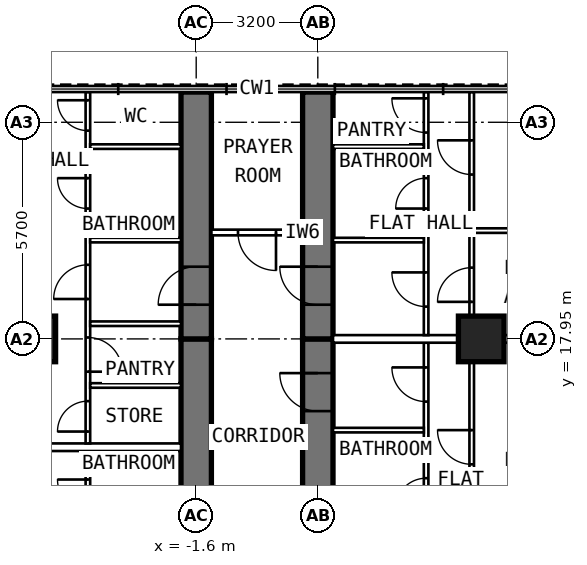
"""IFC4 building model, lengths in metres.
Left out: names, types, materials, properties, quantities, classifications, styles, units other than length and angle.
Written with IfcOpenShell. Run it as: python <this file> out.ifc"""

import sys

from ifc_helpers import new_model, si_unit, direction, frame, frame_2d, origin, origin_2d, place, context, subcontext, project, spatial, rectangle, extrude, element, fill, save


model = new_model("IFC4")
c1 = context("Model", 3, precision=1e-05, world=origin(), true_north=direction((0.0, 1.0)))
c2 = subcontext(c1, "Body", "Model", "MODEL_VIEW")
j1 = project(units=[si_unit("LENGTHUNIT", "METRE"), si_unit("PLANEANGLEUNIT", "RADIAN")], contexts=[c1])
p1 = place(None, origin())
s1 = spatial("IfcSite", under=j1, at=p1, CompositionType="ELEMENT")
p2 = place(p1, origin())
s2 = spatial("IfcBuilding", under=s1, at=p2, CompositionType="ELEMENT")
p3 = place(p2, frame((0.0, 0.0, 138.2)))
s3 = spatial("IfcBuildingStorey", under=s2, at=p3, CompositionType="ELEMENT", Elevation=138.2)
for number, where, z_axis, x_axis in (
    (1, (-5.9, 17.95, 0.0), (0.0, 0.0, 1.0), (0.0, 1.0, 0.0)),
    (2, (5.9, 17.95, 0.0), (0.0, 0.0, 1.0), (0.0, 1.0, 0.0)),
):
    element("IfcColumn", number, at=place(p3, frame(where, z_axis=z_axis, x_axis=x_axis)), inside=s3, PredefinedType="COLUMN", context=c2, shape_type="SweptSolid", body=[
        extrude(rectangle(XDim=1.2, YDim=1.2, at=origin_2d()), origin(), (0.0, 0.0, 1.0), 3.6),
    ])
p4 = place(p3, frame((-1.6, 9.6, 0.0), z_axis=(0.0, 0.0, 1.0), x_axis=(0.0, 1.0, 0.0)))
e3 = element("IfcWall", 3, at=p4, inside=s3, PredefinedType="SHEAR", context=c2, shape_type="SweptSolid", body=[
    extrude(rectangle(XDim=8.35, YDim=0.8, at=frame_2d((4.175, 0.0))), origin(), (0.0, 0.0, 1.0), 3.6),
])
p5 = place(p4, frame((1.3, 0.0, 0.0)))
e4 = element("IfcOpeningElement", 4, at=p5, cuts=e3, PredefinedType="OPENING", context=c2, shape_type="SweptSolid", body=[
    extrude(rectangle(XDim=1.0, YDim=2.1, at=frame_2d((0.5, 1.05))), frame((0.0, 0.412, 0.0), z_axis=(0.0, -1.0, 0.0), x_axis=(1.0, 0.0, 0.0)), (0.0, 0.0, 1.0), 0.824),
])
p6 = place(p3, frame((-1.6, 17.95, 0.0), z_axis=(0.0, 0.0, 1.0), x_axis=(0.0, 1.0, 0.0)))
e5 = element("IfcWall", 5, at=p6, inside=s3, PredefinedType="SHEAR", context=c2, shape_type="SweptSolid", body=[
    extrude(rectangle(XDim=6.495, YDim=0.8, at=frame_2d((3.248, 0.0))), origin(), (0.0, 0.0, 1.0), 3.6),
])
p7 = place(p6, frame((0.9, 0.0, 0.0)))
e6 = element("IfcOpeningElement", 6, at=p7, cuts=e5, PredefinedType="OPENING", context=c2, shape_type="SweptSolid", body=[
    extrude(rectangle(XDim=1.0, YDim=2.1, at=frame_2d((0.5, 1.05))), frame((0.0, 0.412, 0.0), z_axis=(0.0, -1.0, 0.0), x_axis=(1.0, 0.0, 0.0)), (0.0, 0.0, 1.0), 0.824),
])
p8 = place(p3, frame((1.6, 9.6, 0.0), z_axis=(0.0, 0.0, 1.0), x_axis=(0.0, 1.0, 0.0)))
e7 = element("IfcWall", 7, at=p8, inside=s3, PredefinedType="SHEAR", context=c2, shape_type="SweptSolid", body=[
    extrude(rectangle(XDim=8.35, YDim=0.8, at=frame_2d((4.175, 0.0))), origin(), (0.0, 0.0, 1.0), 3.6),
])
p9 = place(p8, frame((6.45, 0.0, 0.0)))
e8 = element("IfcOpeningElement", 8, at=p9, cuts=e7, PredefinedType="OPENING", context=c2, shape_type="SweptSolid", body=[
    extrude(rectangle(XDim=1.0, YDim=2.1, at=frame_2d((0.5, 1.05))), frame((0.0, 0.412, 0.0), z_axis=(0.0, -1.0, 0.0), x_axis=(1.0, 0.0, 0.0)), (0.0, 0.0, 1.0), 0.824),
])
p10 = place(p3, frame((1.6, 17.95, 0.0), z_axis=(0.0, 0.0, 1.0), x_axis=(0.0, 1.0, 0.0)))
e9 = element("IfcWall", 9, at=p10, inside=s3, PredefinedType="SHEAR", context=c2, shape_type="SweptSolid", body=[
    extrude(rectangle(XDim=6.495, YDim=0.8, at=frame_2d((3.248, 0.0))), origin(), (0.0, 0.0, 1.0), 3.6),
])
p11 = place(p10, frame((0.9, 0.0, 0.0)))
e10 = element("IfcOpeningElement", 10, at=p11, cuts=e9, PredefinedType="OPENING", context=c2, shape_type="SweptSolid", body=[
    extrude(rectangle(XDim=1.0, YDim=2.1, at=frame_2d((0.5, 1.05))), frame((0.0, 0.412, 0.0), z_axis=(0.0, -1.0, 0.0), x_axis=(1.0, 0.0, 0.0)), (0.0, 0.0, 1.0), 0.824),
])
p12 = place(p3, frame((-4.45, 10.05, 0.0), z_axis=(0.0, 0.0, 1.0), x_axis=(0.0, 1.0, 0.0)))
e11 = element("IfcWall", 11, at=p12, inside=s3, PredefinedType="PARTITIONING", context=c2, shape_type="SweptSolid", body=[
    extrude(rectangle(XDim=4.95, YDim=0.12, at=frame_2d((2.475, 0.0))), origin(), (0.0, 0.0, 1.0), 3.35),
])
p13 = place(p12, frame((0.8, 0.0, 0.0)))
e12 = element("IfcOpeningElement", 12, at=p13, cuts=e11, PredefinedType="OPENING", context=c2, shape_type="SweptSolid", body=[
    extrude(rectangle(XDim=0.9, YDim=2.1, at=frame_2d((0.45, 1.05))), frame((0.0, 0.072, 0.0), z_axis=(0.0, -1.0, 0.0), x_axis=(1.0, 0.0, 0.0)), (0.0, 0.0, 1.0), 0.144),
])
p14 = place(p12, frame((3.4, 0.0, 0.0)))
e13 = element("IfcOpeningElement", 13, at=p14, cuts=e11, PredefinedType="OPENING", context=c2, shape_type="SweptSolid", body=[
    extrude(rectangle(XDim=0.8, YDim=2.1, at=frame_2d((0.4, 1.05))), frame((0.0, 0.072, 0.0), z_axis=(0.0, -1.0, 0.0), x_axis=(1.0, 0.0, 0.0)), (0.0, 0.0, 1.0), 0.144),
])
p15 = place(p3, frame((-4.45, 15.2, 0.0), z_axis=(0.0, 0.0, 1.0), x_axis=(0.0, 1.0, 0.0)))
e14 = element("IfcWall", 14, at=p15, inside=s3, PredefinedType="PARTITIONING", context=c2, shape_type="SweptSolid", body=[
    extrude(rectangle(XDim=9.245, YDim=0.12, at=frame_2d((4.623, 0.0))), origin(), (0.0, 0.0, 1.0), 3.35),
])
p16 = place(p15, frame((0.312, 0.0, 0.0)))
e15 = element("IfcOpeningElement", 15, at=p16, cuts=e14, PredefinedType="OPENING", context=c2, shape_type="SweptSolid", body=[
    extrude(rectangle(XDim=0.8, YDim=2.1, at=frame_2d((0.4, 1.05))), frame((0.0, 0.072, 0.0), z_axis=(0.0, -1.0, 0.0), x_axis=(1.0, 0.0, 0.0)), (0.0, 0.0, 1.0), 0.144),
])
p17 = place(p15, frame((1.887, 0.0, 0.0)))
e16 = element("IfcOpeningElement", 16, at=p17, cuts=e14, PredefinedType="OPENING", context=c2, shape_type="SweptSolid", body=[
    extrude(rectangle(XDim=0.9, YDim=2.1, at=frame_2d((0.45, 1.05))), frame((0.0, 0.072, 0.0), z_axis=(0.0, -1.0, 0.0), x_axis=(1.0, 0.0, 0.0)), (0.0, 0.0, 1.0), 0.144),
])
p18 = place(p15, frame((3.8, 0.0, 0.0)))
e17 = element("IfcOpeningElement", 17, at=p18, cuts=e14, PredefinedType="OPENING", context=c2, shape_type="SweptSolid", body=[
    extrude(rectangle(XDim=0.9, YDim=2.1, at=frame_2d((0.45, 1.05))), frame((0.0, 0.072, 0.0), z_axis=(0.0, -1.0, 0.0), x_axis=(1.0, 0.0, 0.0)), (0.0, 0.0, 1.0), 0.144),
])
p19 = place(p15, frame((6.18, 0.0, 0.0)))
e18 = element("IfcOpeningElement", 18, at=p19, cuts=e14, PredefinedType="OPENING", context=c2, shape_type="SweptSolid", body=[
    extrude(rectangle(XDim=0.8, YDim=2.1, at=frame_2d((0.4, 1.05))), frame((0.0, 0.072, 0.0), z_axis=(0.0, -1.0, 0.0), x_axis=(1.0, 0.0, 0.0)), (0.0, 0.0, 1.0), 0.144),
])
p20 = place(p15, frame((8.23, 0.0, 0.0)))
e19 = element("IfcOpeningElement", 19, at=p20, cuts=e14, PredefinedType="OPENING", context=c2, shape_type="SweptSolid", body=[
    extrude(rectangle(XDim=0.8, YDim=2.1, at=frame_2d((0.4, 1.05))), frame((0.0, 0.072, 0.0), z_axis=(0.0, -1.0, 0.0), x_axis=(1.0, 0.0, 0.0)), (0.0, 0.0, 1.0), 0.144),
])
for number, where, z_axis, x_axis in (
    (20, (-2.0, 16.725, 0.0), (0.0, 0.0, 1.0), (-1.0, 0.0, 0.0)),
    (21, (-2.0, 18.35, 0.0), (0.0, 0.0, 1.0), (-1.0, 0.0, 0.0)),
    (22, (-2.0, 20.55, 0.0), (0.0, 0.0, 1.0), (-1.0, 0.0, 0.0)),
    (23, (-2.0, 23.01, 0.0), (0.0, 0.0, 1.0), (-1.0, 0.0, 0.0)),
):
    element("IfcWall", number, at=place(p3, frame(where, z_axis=z_axis, x_axis=x_axis)), inside=s3, PredefinedType="PARTITIONING", context=c2, shape_type="SweptSolid", body=[
        extrude(rectangle(XDim=2.39, YDim=0.12, at=frame_2d((1.195, 0.0))), origin(), (0.0, 0.0, 1.0), 3.35),
    ])
p21 = place(p3, frame((-2.0, 15.1, 0.0), z_axis=(0.0, 0.0, 1.0), x_axis=(-1.0, 0.0, 0.0)))
e24 = element("IfcWall", 24, at=p21, inside=s3, PredefinedType="PARTITIONING", context=c2, shape_type="SweptSolid", body=[
    extrude(rectangle(XDim=8.7, YDim=0.2, at=frame_2d((4.35, 0.0))), origin(), (0.0, 0.0, 1.0), 3.35),
])
p22 = place(p3, frame((4.45, 10.05, 0.0), z_axis=(0.0, 0.0, 1.0), x_axis=(0.0, 1.0, 0.0)))
e25 = element("IfcWall", 25, at=p22, inside=s3, PredefinedType="PARTITIONING", context=c2, shape_type="SweptSolid", body=[
    extrude(rectangle(XDim=7.8, YDim=0.12, at=frame_2d((3.9, 0.0))), origin(), (0.0, 0.0, 1.0), 3.35),
])
p23 = place(p22, frame((0.61, 0.0, 0.0)))
e26 = element("IfcOpeningElement", 26, at=p23, cuts=e25, PredefinedType="OPENING", context=c2, shape_type="SweptSolid", body=[
    extrude(rectangle(XDim=0.9, YDim=2.1, at=frame_2d((0.45, 1.05))), frame((0.0, 0.072, 0.0), z_axis=(0.0, -1.0, 0.0), x_axis=(1.0, 0.0, 0.0)), (0.0, 0.0, 1.0), 0.144),
])
p24 = place(p22, frame((3.435, 0.0, 0.0)))
e27 = element("IfcOpeningElement", 27, at=p24, cuts=e25, PredefinedType="OPENING", context=c2, shape_type="SweptSolid", body=[
    extrude(rectangle(XDim=0.8, YDim=2.1, at=frame_2d((0.4, 1.05))), frame((0.0, 0.072, 0.0), z_axis=(0.0, -1.0, 0.0), x_axis=(1.0, 0.0, 0.0)), (0.0, 0.0, 1.0), 0.144),
])
p25 = place(p22, frame((6.25, 0.0, 0.0)))
e28 = element("IfcOpeningElement", 28, at=p25, cuts=e25, PredefinedType="OPENING", context=c2, shape_type="SweptSolid", body=[
    extrude(rectangle(XDim=0.9, YDim=2.1, at=frame_2d((0.45, 1.05))), frame((0.0, 0.072, 0.0), z_axis=(0.0, -1.0, 0.0), x_axis=(1.0, 0.0, 0.0)), (0.0, 0.0, 1.0), 0.144),
])
p26 = place(p3, frame((5.65, 9.6, 0.0), z_axis=(0.0, 0.0, 1.0), x_axis=(0.0, 1.0, 0.0)))
e29 = element("IfcWall", 29, at=p26, inside=s3, PredefinedType="PARTITIONING", context=c2, shape_type="SweptSolid", body=[
    extrude(rectangle(XDim=8.1, YDim=0.12, at=frame_2d((4.05, 0.0))), origin(), (0.0, 0.0, 1.0), 3.35),
])
p27 = place(p26, frame((5.05, 0.0, 0.0)))
e30 = element("IfcOpeningElement", 30, at=p27, cuts=e29, PredefinedType="OPENING", context=c2, shape_type="SweptSolid", body=[
    extrude(rectangle(XDim=0.9, YDim=2.1, at=frame_2d((0.45, 1.05))), frame((0.0, 0.072, 0.0), z_axis=(0.0, -1.0, 0.0), x_axis=(1.0, 0.0, 0.0)), (0.0, 0.0, 1.0), 0.144),
])
p28 = place(p3, frame((2.0, 15.55, 0.0), z_axis=(0.0, 0.0, 1.0), x_axis=(1.0, 0.0, 0.0)))
e31 = element("IfcWall", 31, at=p28, inside=s3, PredefinedType="PARTITIONING", context=c2, shape_type="SweptSolid", body=[
    extrude(rectangle(XDim=2.39, YDim=0.12, at=frame_2d((1.195, 0.0))), origin(), (0.0, 0.0, 1.0), 3.35),
])
p29 = place(p3, frame((4.45, 18.05, 0.0), z_axis=(0.0, 0.0, 1.0), x_axis=(0.0, 1.0, 0.0)))
e32 = element("IfcWall", 32, at=p29, inside=s3, PredefinedType="PARTITIONING", context=c2, shape_type="SweptSolid", body=[
    extrude(rectangle(XDim=6.395, YDim=0.12, at=frame_2d((3.198, 0.0))), origin(), (0.0, 0.0, 1.0), 3.35),
])
p30 = place(p29, frame((0.75, 0.0, 0.0)))
e33 = element("IfcOpeningElement", 33, at=p30, cuts=e32, PredefinedType="OPENING", context=c2, shape_type="SweptSolid", body=[
    extrude(rectangle(XDim=0.9, YDim=2.1, at=frame_2d((0.45, 1.05))), frame((0.0, 0.072, 0.0), z_axis=(0.0, -1.0, 0.0), x_axis=(1.0, 0.0, 0.0)), (0.0, 0.0, 1.0), 0.144),
])
p31 = place(p29, frame((3.33, 0.0, 0.0)))
e34 = element("IfcOpeningElement", 34, at=p31, cuts=e32, PredefinedType="OPENING", context=c2, shape_type="SweptSolid", body=[
    extrude(rectangle(XDim=0.8, YDim=2.1, at=frame_2d((0.4, 1.05))), frame((0.0, 0.072, 0.0), z_axis=(0.0, -1.0, 0.0), x_axis=(1.0, 0.0, 0.0)), (0.0, 0.0, 1.0), 0.144),
])
p32 = place(p29, frame((5.33, 0.0, 0.0)))
e35 = element("IfcOpeningElement", 35, at=p32, cuts=e32, PredefinedType="OPENING", context=c2, shape_type="SweptSolid", body=[
    extrude(rectangle(XDim=0.9, YDim=2.1, at=frame_2d((0.45, 1.05))), frame((0.0, 0.072, 0.0), z_axis=(0.0, -1.0, 0.0), x_axis=(1.0, 0.0, 0.0)), (0.0, 0.0, 1.0), 0.144),
])
p33 = place(p3, frame((5.65, 18.05, 0.0), z_axis=(0.0, 0.0, 1.0), x_axis=(0.0, 1.0, 0.0)))
e36 = element("IfcWall", 36, at=p33, inside=s3, PredefinedType="PARTITIONING", context=c2, shape_type="SweptSolid", body=[
    extrude(rectangle(XDim=6.395, YDim=0.12, at=frame_2d((3.198, 0.0))), origin(), (0.0, 0.0, 1.0), 3.35),
])
p34 = place(p33, frame((0.875, 0.0, 0.0)))
e37 = element("IfcOpeningElement", 37, at=p34, cuts=e36, PredefinedType="OPENING", context=c2, shape_type="SweptSolid", body=[
    extrude(rectangle(XDim=0.9, YDim=2.1, at=frame_2d((0.45, 1.05))), frame((0.0, 0.072, 0.0), z_axis=(0.0, -1.0, 0.0), x_axis=(1.0, 0.0, 0.0)), (0.0, 0.0, 1.0), 0.144),
])
p35 = place(p33, frame((4.225, 0.0, 0.0)))
e38 = element("IfcOpeningElement", 38, at=p35, cuts=e36, PredefinedType="OPENING", context=c2, shape_type="SweptSolid", body=[
    extrude(rectangle(XDim=0.9, YDim=2.1, at=frame_2d((0.45, 1.05))), frame((0.0, 0.072, 0.0), z_axis=(0.0, -1.0, 0.0), x_axis=(1.0, 0.0, 0.0)), (0.0, 0.0, 1.0), 0.144),
])
p36 = place(p3, frame((5.71, 20.8, 0.0), z_axis=(0.0, 0.0, 1.0), x_axis=(1.0, 0.0, 0.0)))
e39 = element("IfcWall", 39, at=p36, inside=s3, PredefinedType="PARTITIONING", context=c2, shape_type="SweptSolid", body=[
    extrude(rectangle(XDim=4.99, YDim=0.12, at=frame_2d((2.495, 0.0))), origin(), (0.0, 0.0, 1.0), 3.35),
])
for number, where, z_axis, x_axis in (
    (40, (2.0, 20.55, 0.0), (0.0, 0.0, 1.0), (1.0, 0.0, 0.0)),
    (41, (2.0, 23.01, 0.0), (0.0, 0.0, 1.0), (1.0, 0.0, 0.0)),
):
    element("IfcWall", number, at=place(p3, frame(where, z_axis=z_axis, x_axis=x_axis)), inside=s3, PredefinedType="PARTITIONING", context=c2, shape_type="SweptSolid", body=[
        extrude(rectangle(XDim=2.39, YDim=0.12, at=frame_2d((1.195, 0.0))), origin(), (0.0, 0.0, 1.0), 3.35),
    ])
p37 = place(p3, frame((2.0, 17.95, 0.0), z_axis=(0.0, 0.0, 1.0), x_axis=(1.0, 0.0, 0.0)))
e42 = element("IfcWall", 42, at=p37, inside=s3, PredefinedType="PARTITIONING", context=c2, shape_type="SweptSolid", body=[
    extrude(rectangle(XDim=8.7, YDim=0.2, at=frame_2d((4.35, 0.0))), origin(), (0.0, 0.0, 1.0), 2.45),
])
p38 = place(p3, frame((1.2, 20.75, 0.0), z_axis=(0.0, 0.0, 1.0), x_axis=(-1.0, 0.0, 0.0)))
e43 = element("IfcWall", 43, at=p38, inside=s3, PredefinedType="PARTITIONING", context=c2, shape_type="SweptSolid", body=[
    extrude(rectangle(XDim=2.4, YDim=0.15, at=frame_2d((1.2, 0.0))), origin(), (0.0, 0.0, 1.0), 3.35),
])
p39 = place(p38, frame((0.7, 0.0, 0.0)))
e44 = element("IfcOpeningElement", 44, at=p39, cuts=e43, PredefinedType="OPENING", context=c2, shape_type="SweptSolid", body=[
    extrude(rectangle(XDim=1.0, YDim=2.1, at=frame_2d((0.5, 1.05))), frame((0.0, 0.087, 0.0), z_axis=(0.0, -1.0, 0.0), x_axis=(1.0, 0.0, 0.0)), (0.0, 0.0, 1.0), 0.174),
])
p40 = place(p14, origin())
e45 = element("IfcDoor", 45, at=p40, inside=s3, OperationType="SINGLE_SWING_RIGHT", PredefinedType="DOOR", context=c2, shape_type="SweptSolid", body=[
    extrude(rectangle(XDim=0.8, YDim=2.1, at=frame_2d((0.4, 1.05))), frame((0.0, 0.025, 0.0), z_axis=(0.0, -1.0, 0.0), x_axis=(1.0, 0.0, 0.0)), (0.0, 0.0, 1.0), 0.05),
])
fill(e13, e45)
p41 = place(p7, origin())
e46 = element("IfcDoor", 46, at=p41, inside=s3, OperationType="SINGLE_SWING_LEFT", PredefinedType="DOOR", context=c2, shape_type="SweptSolid", body=[
    extrude(rectangle(XDim=1.0, YDim=2.1, at=frame_2d((0.5, 1.05))), frame((0.0, 0.15, 0.0), z_axis=(0.0, -1.0, 0.0), x_axis=(1.0, 0.0, 0.0)), (0.0, 0.0, 1.0), 0.3),
])
fill(e6, e46)
p42 = place(p16, origin())
e47 = element("IfcDoor", 47, at=p42, inside=s3, OperationType="SINGLE_SWING_LEFT", PredefinedType="DOOR", context=c2, shape_type="SweptSolid", body=[
    extrude(rectangle(XDim=0.8, YDim=2.1, at=frame_2d((0.4, 1.05))), frame((0.0, 0.025, 0.0), z_axis=(0.0, -1.0, 0.0), x_axis=(1.0, 0.0, 0.0)), (0.0, 0.0, 1.0), 0.05),
])
fill(e15, e47)
p43 = place(p17, frame((0.9, 0.0, 0.0), z_axis=(0.0, 0.0, 1.0), x_axis=(-1.0, 0.0, 0.0)))
e48 = element("IfcDoor", 48, at=p43, inside=s3, OperationType="SINGLE_SWING_RIGHT", PredefinedType="DOOR", context=c2, shape_type="SweptSolid", body=[
    extrude(rectangle(XDim=0.9, YDim=2.1, at=frame_2d((0.45, 1.05))), frame((0.0, 0.025, 0.0), z_axis=(0.0, -1.0, 0.0), x_axis=(1.0, 0.0, 0.0)), (0.0, 0.0, 1.0), 0.05),
])
fill(e16, e48)
p44 = place(p18, origin())
e49 = element("IfcDoor", 49, at=p44, inside=s3, OperationType="SINGLE_SWING_LEFT", PredefinedType="DOOR", context=c2, shape_type="SweptSolid", body=[
    extrude(rectangle(XDim=0.9, YDim=2.1, at=frame_2d((0.45, 1.05))), frame((0.0, 0.025, 0.0), z_axis=(0.0, -1.0, 0.0), x_axis=(1.0, 0.0, 0.0)), (0.0, 0.0, 1.0), 0.05),
])
fill(e17, e49)
p45 = place(p19, origin())
e50 = element("IfcDoor", 50, at=p45, inside=s3, OperationType="SINGLE_SWING_RIGHT", PredefinedType="DOOR", context=c2, shape_type="SweptSolid", body=[
    extrude(rectangle(XDim=0.8, YDim=2.1, at=frame_2d((0.4, 1.05))), frame((0.0, 0.025, 0.0), z_axis=(0.0, -1.0, 0.0), x_axis=(1.0, 0.0, 0.0)), (0.0, 0.0, 1.0), 0.05),
])
fill(e18, e50)
p46 = place(p20, origin())
e51 = element("IfcDoor", 51, at=p46, inside=s3, OperationType="SINGLE_SWING_RIGHT", PredefinedType="DOOR", context=c2, shape_type="SweptSolid", body=[
    extrude(rectangle(XDim=0.8, YDim=2.1, at=frame_2d((0.4, 1.05))), frame((0.0, 0.025, 0.0), z_axis=(0.0, -1.0, 0.0), x_axis=(1.0, 0.0, 0.0)), (0.0, 0.0, 1.0), 0.05),
])
fill(e19, e51)
p47 = place(p9, origin())
e52 = element("IfcDoor", 52, at=p47, inside=s3, OperationType="SINGLE_SWING_RIGHT", PredefinedType="DOOR", context=c2, shape_type="SweptSolid", body=[
    extrude(rectangle(XDim=1.0, YDim=2.1, at=frame_2d((0.5, 1.05))), frame((0.0, 0.15, 0.0), z_axis=(0.0, -1.0, 0.0), x_axis=(1.0, 0.0, 0.0)), (0.0, 0.0, 1.0), 0.3),
])
fill(e8, e52)
p48 = place(p27, origin())
e53 = element("IfcDoor", 53, at=p48, inside=s3, OperationType="SINGLE_SWING_RIGHT", PredefinedType="DOOR", context=c2, shape_type="SweptSolid", body=[
    extrude(rectangle(XDim=0.9, YDim=2.1, at=frame_2d((0.45, 1.05))), frame((0.0, 0.025, 0.0), z_axis=(0.0, -1.0, 0.0), x_axis=(1.0, 0.0, 0.0)), (0.0, 0.0, 1.0), 0.05),
])
fill(e30, e53)
p49 = place(p24, origin())
e54 = element("IfcDoor", 54, at=p49, inside=s3, OperationType="SINGLE_SWING_LEFT", PredefinedType="DOOR", context=c2, shape_type="SweptSolid", body=[
    extrude(rectangle(XDim=0.8, YDim=2.1, at=frame_2d((0.4, 1.05))), frame((0.0, 0.025, 0.0), z_axis=(0.0, -1.0, 0.0), x_axis=(1.0, 0.0, 0.0)), (0.0, 0.0, 1.0), 0.05),
])
fill(e27, e54)
p50 = place(p25, origin())
e55 = element("IfcDoor", 55, at=p50, inside=s3, OperationType="SINGLE_SWING_RIGHT", PredefinedType="DOOR", context=c2, shape_type="SweptSolid", body=[
    extrude(rectangle(XDim=0.9, YDim=2.1, at=frame_2d((0.45, 1.05))), frame((0.0, 0.025, 0.0), z_axis=(0.0, -1.0, 0.0), x_axis=(1.0, 0.0, 0.0)), (0.0, 0.0, 1.0), 0.05),
])
fill(e28, e55)
p51 = place(p11, origin())
e56 = element("IfcDoor", 56, at=p51, inside=s3, OperationType="SINGLE_SWING_RIGHT", PredefinedType="DOOR", context=c2, shape_type="SweptSolid", body=[
    extrude(rectangle(XDim=1.0, YDim=2.1, at=frame_2d((0.5, 1.05))), frame((0.0, 0.15, 0.0), z_axis=(0.0, -1.0, 0.0), x_axis=(1.0, 0.0, 0.0)), (0.0, 0.0, 1.0), 0.3),
])
fill(e10, e56)
p52 = place(p34, origin())
e57 = element("IfcDoor", 57, at=p52, inside=s3, OperationType="SINGLE_SWING_LEFT", PredefinedType="DOOR", context=c2, shape_type="SweptSolid", body=[
    extrude(rectangle(XDim=0.9, YDim=2.1, at=frame_2d((0.45, 1.05))), frame((0.0, 0.025, 0.0), z_axis=(0.0, -1.0, 0.0), x_axis=(1.0, 0.0, 0.0)), (0.0, 0.0, 1.0), 0.05),
])
fill(e37, e57)
p53 = place(p35, origin())
e58 = element("IfcDoor", 58, at=p53, inside=s3, OperationType="SINGLE_SWING_RIGHT", PredefinedType="DOOR", context=c2, shape_type="SweptSolid", body=[
    extrude(rectangle(XDim=0.9, YDim=2.1, at=frame_2d((0.45, 1.05))), frame((0.0, 0.025, 0.0), z_axis=(0.0, -1.0, 0.0), x_axis=(1.0, 0.0, 0.0)), (0.0, 0.0, 1.0), 0.05),
])
fill(e38, e58)
p54 = place(p30, origin())
e59 = element("IfcDoor", 59, at=p54, inside=s3, OperationType="SINGLE_SWING_RIGHT", PredefinedType="DOOR", context=c2, shape_type="SweptSolid", body=[
    extrude(rectangle(XDim=0.9, YDim=2.1, at=frame_2d((0.45, 1.05))), frame((0.0, 0.025, 0.0), z_axis=(0.0, -1.0, 0.0), x_axis=(1.0, 0.0, 0.0)), (0.0, 0.0, 1.0), 0.05),
])
fill(e33, e59)
p55 = place(p31, origin())
e60 = element("IfcDoor", 60, at=p55, inside=s3, OperationType="SINGLE_SWING_LEFT", PredefinedType="DOOR", context=c2, shape_type="SweptSolid", body=[
    extrude(rectangle(XDim=0.8, YDim=2.1, at=frame_2d((0.4, 1.05))), frame((0.0, 0.025, 0.0), z_axis=(0.0, -1.0, 0.0), x_axis=(1.0, 0.0, 0.0)), (0.0, 0.0, 1.0), 0.05),
])
fill(e34, e60)
p56 = place(p32, origin())
e61 = element("IfcDoor", 61, at=p56, inside=s3, OperationType="SINGLE_SWING_RIGHT", PredefinedType="DOOR", context=c2, shape_type="SweptSolid", body=[
    extrude(rectangle(XDim=0.9, YDim=2.1, at=frame_2d((0.45, 1.05))), frame((0.0, 0.025, 0.0), z_axis=(0.0, -1.0, 0.0), x_axis=(1.0, 0.0, 0.0)), (0.0, 0.0, 1.0), 0.05),
])
fill(e35, e61)
p57 = place(p39, origin())
e62 = element("IfcDoor", 62, at=p57, inside=s3, OperationType="SINGLE_SWING_LEFT", PredefinedType="DOOR", context=c2, shape_type="SweptSolid", body=[
    extrude(rectangle(XDim=1.0, YDim=2.1, at=frame_2d((0.5, 1.05))), frame((0.0, 0.025, 0.0), z_axis=(0.0, -1.0, 0.0), x_axis=(1.0, 0.0, 0.0)), (0.0, 0.0, 1.0), 0.05),
])
fill(e44, e62)
save(model, sys.argv[1])
